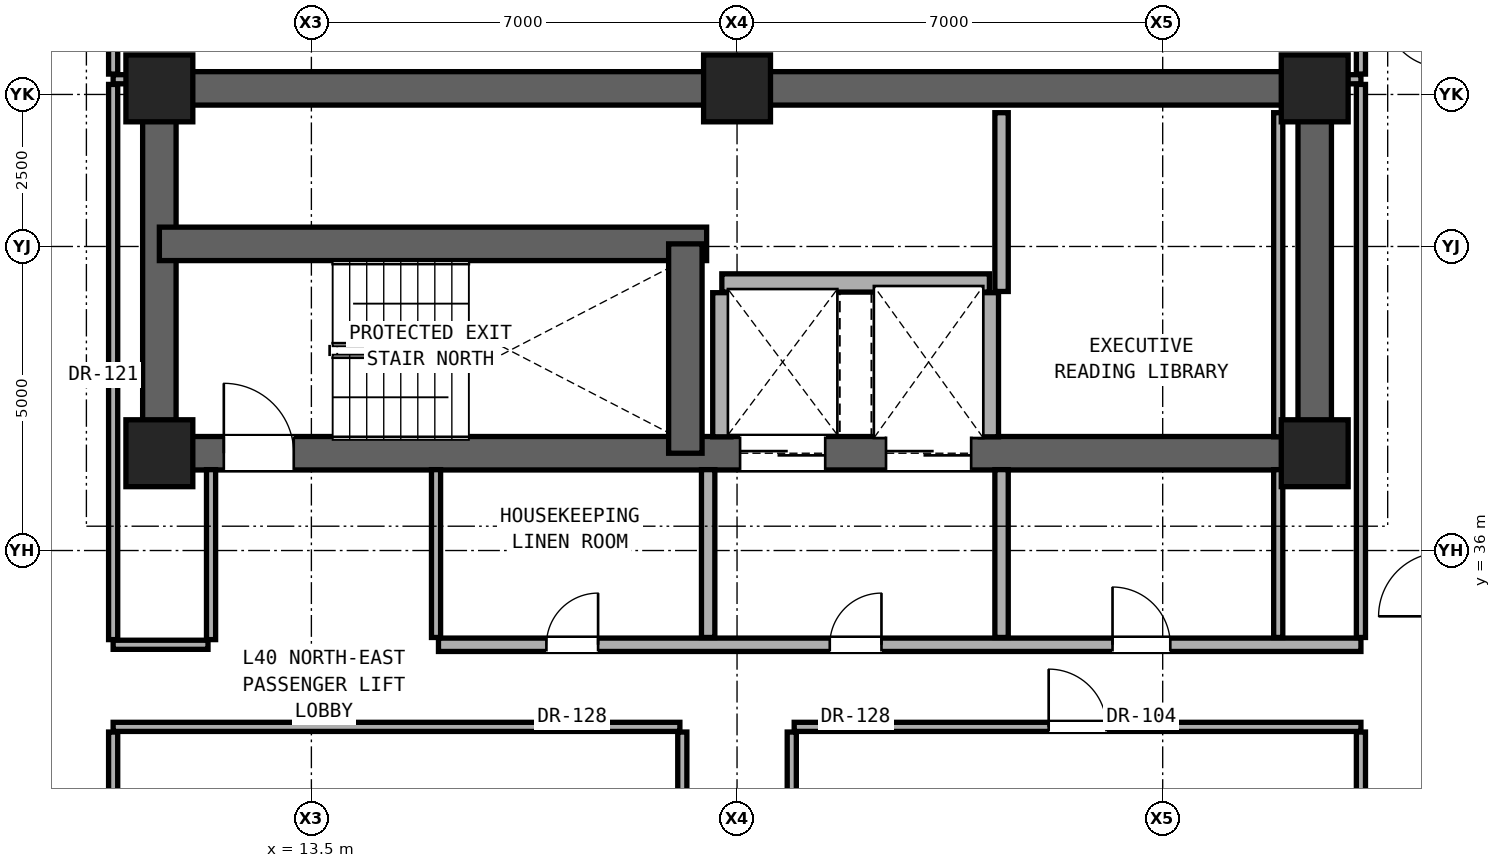
"""IFC4 building model, lengths in metres.
Left out: names, types, materials, properties, quantities, classifications, styles, units other than length and angle.
Written with IfcOpenShell. Run it as: python <this file> out.ifc"""

import sys

from ifc_helpers import new_model, si_unit, direction, frame, frame_2d, origin, origin_2d, place, context, subcontext, project, spatial, rectangle, extrude, element, fill, save


model = new_model("IFC4")
c1 = context("Model", 3, precision=1e-05, world=origin(), true_north=direction((0.0, 1.0)))
c2 = subcontext(c1, "Body", "Model", "MODEL_VIEW")
j1 = project(units=[si_unit("LENGTHUNIT", "METRE"), si_unit("PLANEANGLEUNIT", "RADIAN")], contexts=[c1])
p1 = place(None, origin())
s1 = spatial("IfcSite", under=j1, at=p1, CompositionType="ELEMENT")
p2 = place(p1, origin())
s2 = spatial("IfcBuilding", under=s1, at=p2, CompositionType="ELEMENT")
p3 = place(p2, frame((0.0, 0.0, 141.2)))
s3 = spatial("IfcBuildingStorey", under=s2, at=p3, CompositionType="ELEMENT", Elevation=141.2)
for number, where, z_axis, x_axis in (
    (1, (11.0, 37.6, 0.0), (0.0, 0.0, 1.0), (1.0, 0.0, 0.0)),
    (2, (30.0, 37.6, 0.0), (0.0, 0.0, 1.0), (1.0, 0.0, 0.0)),
    (3, (11.0, 43.6, 0.0), (0.0, 0.0, 1.0), (1.0, 0.0, 0.0)),
    (4, (20.5, 43.6, 0.0), (0.0, 0.0, 1.0), (1.0, 0.0, 0.0)),
    (5, (30.0, 43.6, 0.0), (0.0, 0.0, 1.0), (1.0, 0.0, 0.0)),
):
    element("IfcColumn", number, at=place(p3, frame(where, z_axis=z_axis, x_axis=x_axis)), inside=s3, PredefinedType="COLUMN", context=c2, shape_type="SweptSolid", body=[
        extrude(rectangle(XDim=1.1, YDim=1.1, at=origin_2d()), origin(), (0.0, 0.0, 1.0), 3.3),
    ])
p4 = place(p3, frame((11.0, 43.6, 0.0), z_axis=(0.0, 0.0, 1.0), x_axis=(1.0, 0.0, 0.0)))
e6 = element("IfcWall", 6, at=p4, inside=s3, PredefinedType="SHEAR", context=c2, shape_type="SweptSolid", body=[
    extrude(rectangle(XDim=19.0, YDim=0.55, at=frame_2d((9.5, 0.0))), origin(), (0.0, 0.0, 1.0), 3.08),
])
for number, where, z_axis, x_axis in (
    (7, (11.0, 37.6, 0.0), (0.0, 0.0, 1.0), (0.0, 1.0, 0.0)),
    (8, (30.0, 37.6, 0.0), (0.0, 0.0, 1.0), (0.0, 1.0, 0.0)),
):
    element("IfcWall", number, at=place(p3, frame(where, z_axis=z_axis, x_axis=x_axis)), inside=s3, PredefinedType="SHEAR", context=c2, shape_type="SweptSolid", body=[
        extrude(rectangle(XDim=6.0, YDim=0.55, at=frame_2d((3.0, 0.0))), origin(), (0.0, 0.0, 1.0), 3.08),
    ])
p5 = place(p3, frame((11.0, 37.6, 0.0), z_axis=(0.0, 0.0, 1.0), x_axis=(1.0, 0.0, 0.0)))
e9 = element("IfcWall", 9, at=p5, inside=s3, PredefinedType="SHEAR", context=c2, shape_type="SweptSolid", body=[
    extrude(rectangle(XDim=19.0, YDim=0.55, at=frame_2d((9.5, 0.0))), origin(), (0.0, 0.0, 1.0), 3.08),
])
p6 = place(p5, frame((1.06, 0.0, 0.0)))
e10 = element("IfcOpeningElement", 10, at=p6, cuts=e9, PredefinedType="OPENING", context=c2, shape_type="SweptSolid", body=[
    extrude(rectangle(XDim=1.15, YDim=2.2, at=frame_2d((0.575, 1.1))), frame((0.0, 0.285, 0.0), z_axis=(0.0, -1.0, 0.0), x_axis=(1.0, 0.0, 0.0)), (0.0, 0.0, 1.0), 0.57),
])
p7 = place(p5, frame((9.55, 0.0, 0.0)))
e11 = element("IfcOpeningElement", 11, at=p7, cuts=e9, PredefinedType="OPENING", context=c2, shape_type="SweptSolid", body=[
    extrude(rectangle(XDim=1.4, YDim=2.35, at=frame_2d((0.7, 1.175))), frame((0.0, 0.285, 0.0), z_axis=(0.0, -1.0, 0.0), x_axis=(1.0, 0.0, 0.0)), (0.0, 0.0, 1.0), 0.57),
])
p8 = place(p5, frame((11.95, 0.0, 0.0)))
e12 = element("IfcOpeningElement", 12, at=p8, cuts=e9, PredefinedType="OPENING", context=c2, shape_type="SweptSolid", body=[
    extrude(rectangle(XDim=1.4, YDim=2.35, at=frame_2d((0.7, 1.175))), frame((0.0, 0.285, 0.0), z_axis=(0.0, -1.0, 0.0), x_axis=(1.0, 0.0, 0.0)), (0.0, 0.0, 1.0), 0.57),
])
p9 = place(p3, frame((11.0, 41.043, 0.0), z_axis=(0.0, 0.0, 1.0), x_axis=(1.0, 0.0, 0.0)))
e13 = element("IfcWall", 13, at=p9, inside=s3, PredefinedType="SHEAR", context=c2, shape_type="SweptSolid", body=[
    extrude(rectangle(XDim=9.0, YDim=0.55, at=frame_2d((4.5, 0.0))), origin(), (0.0, 0.0, 1.0), 3.08),
])
p10 = place(p3, frame((19.65, 37.6, 0.0), z_axis=(0.0, 0.0, 1.0), x_axis=(0.0, 1.0, 0.0)))
e14 = element("IfcWall", 14, at=p10, inside=s3, PredefinedType="SHEAR", context=c2, shape_type="SweptSolid", body=[
    extrude(rectangle(XDim=3.443, YDim=0.55, at=frame_2d((1.721, 0.0))), origin(), (0.0, 0.0, 1.0), 3.08),
])
p11 = place(p3, frame((10.24, 33.1, 0.0), z_axis=(0.0, 0.0, 1.0), x_axis=(1.0, 0.0, 0.0)))
e15 = element("IfcWall", 15, at=p11, inside=s3, PredefinedType="PARTITIONING", context=c2, shape_type="SweptSolid", body=[
    extrude(rectangle(XDim=9.32, YDim=0.15, at=frame_2d((4.66, 0.0))), origin(), (0.0, 0.0, 1.0), 2.216),
])
p12 = place(p3, frame((21.44, 33.1, 0.0), z_axis=(0.0, 0.0, 1.0), x_axis=(1.0, 0.0, 0.0)))
e16 = element("IfcWall", 16, at=p12, inside=s3, PredefinedType="PARTITIONING", context=c2, shape_type="SweptSolid", body=[
    extrude(rectangle(XDim=9.32, YDim=0.15, at=frame_2d((4.66, 0.0))), origin(), (0.0, 0.0, 1.0), 2.216),
])
p13 = place(p12, frame((4.185, 0.0, 0.0)))
e17 = element("IfcOpeningElement", 17, at=p13, cuts=e16, PredefinedType="OPENING", context=c2, shape_type="SweptSolid", body=[
    extrude(rectangle(XDim=0.95, YDim=2.15, at=frame_2d((0.475, 1.075))), frame((0.0, 0.085, 0.0), z_axis=(0.0, -1.0, 0.0), x_axis=(1.0, 0.0, 0.0)), (0.0, 0.0, 1.0), 0.17),
])
p14 = place(p3, frame((10.24, 34.45, 0.0), z_axis=(0.0, 0.0, 1.0), x_axis=(1.0, 0.0, 0.0)))
e18 = element("IfcWall", 18, at=p14, inside=s3, PredefinedType="PARTITIONING", context=c2, shape_type="SweptSolid", body=[
    extrude(rectangle(XDim=1.56, YDim=0.15, at=frame_2d((0.78, 0.0))), origin(), (0.0, 0.0, 1.0), 2.216),
])
p15 = place(p3, frame((15.59, 34.45, 0.0), z_axis=(0.0, 0.0, 1.0), x_axis=(1.0, 0.0, 0.0)))
e19 = element("IfcWall", 19, at=p15, inside=s3, PredefinedType="SOLIDWALL", context=c2, shape_type="SweptSolid", body=[
    extrude(rectangle(XDim=15.17, YDim=0.22, at=frame_2d((7.585, 0.0))), origin(), (0.0, 0.0, 1.0), 2.216),
])
p16 = place(p15, frame((6.435, 0.0, 0.0)))
e20 = element("IfcOpeningElement", 20, at=p16, cuts=e19, PredefinedType="OPENING", context=c2, shape_type="SweptSolid", body=[
    extrude(rectangle(XDim=0.85, YDim=2.01, at=frame_2d((0.425, 1.005))), frame((0.0, 0.12, 0.0), z_axis=(0.0, -1.0, 0.0), x_axis=(1.0, 0.0, 0.0)), (0.0, 0.0, 1.0), 0.24),
])
p17 = place(p15, frame((11.085, 0.0, 0.0)))
e21 = element("IfcOpeningElement", 21, at=p17, cuts=e19, PredefinedType="OPENING", context=c2, shape_type="SweptSolid", body=[
    extrude(rectangle(XDim=0.95, YDim=2.15, at=frame_2d((0.475, 1.075))), frame((0.0, 0.12, 0.0), z_axis=(0.0, -1.0, 0.0), x_axis=(1.0, 0.0, 0.0)), (0.0, 0.0, 1.0), 0.24),
])
p18 = place(p15, frame((1.775, 0.0, 0.0)))
e22 = element("IfcOpeningElement", 22, at=p18, cuts=e19, PredefinedType="OPENING", context=c2, shape_type="SweptSolid", body=[
    extrude(rectangle(XDim=0.85, YDim=2.01, at=frame_2d((0.425, 1.005))), frame((0.0, 0.12, 0.0), z_axis=(0.0, -1.0, 0.0), x_axis=(1.0, 0.0, 0.0)), (0.0, 0.0, 1.0), 0.24),
])
p19 = place(p3, frame((20.25, 40.4, 0.0), z_axis=(0.0, 0.0, 1.0), x_axis=(1.0, 0.0, 0.0)))
e23 = element("IfcWall", 23, at=p19, inside=s3, PredefinedType="SOLIDWALL", context=c2, shape_type="SweptSolid", body=[
    extrude(rectangle(XDim=4.4, YDim=0.3, at=frame_2d((2.2, 0.0))), origin(), (0.0, 0.0, 1.0), 3.08),
])
for number, where, z_axis, x_axis in (
    (24, (10.24, 43.75, 0.0), (0.0, 0.0, 1.0), (1.0, 0.0, 0.0)),
    (25, (30.27, 43.75, 0.0), (0.0, 0.0, 1.0), (1.0, 0.0, 0.0)),
):
    element("IfcWall", number, at=place(p3, frame(where, z_axis=z_axis, x_axis=x_axis)), inside=s3, PredefinedType="PARTITIONING", context=c2, shape_type="SweptSolid", body=[
        extrude(rectangle(XDim=0.49, YDim=0.15, at=frame_2d((0.245, 0.0))), origin(), (0.0, 0.0, 1.0), 3.08),
    ])
p20 = place(p3, frame((10.24, 27.485, 0.0), z_axis=(0.0, 0.0, 1.0), x_axis=(0.0, 1.0, 0.0)))
e26 = element("IfcWall", 26, at=p20, inside=s3, PredefinedType="PARTITIONING", context=c2, shape_type="SweptSolid", body=[
    extrude(rectangle(XDim=5.53, YDim=0.15, at=frame_2d((2.765, 0.0))), origin(), (0.0, 0.0, 1.0), 2.299),
])
p21 = place(p20, frame((2.29, 0.0, 0.0)))
e27 = element("IfcOpeningElement", 27, at=p21, cuts=e26, PredefinedType="OPENING", context=c2, shape_type="SweptSolid", body=[
    extrude(rectangle(XDim=0.95, YDim=2.15, at=frame_2d((0.475, 1.075))), frame((0.0, 0.085, 0.0), z_axis=(0.0, -1.0, 0.0), x_axis=(1.0, 0.0, 0.0)), (0.0, 0.0, 1.0), 0.17),
])
p22 = place(p3, frame((10.24, 34.535, 0.0), z_axis=(0.0, 0.0, 1.0), x_axis=(0.0, 1.0, 0.0)))
e28 = element("IfcWall", 28, at=p22, inside=s3, PredefinedType="PARTITIONING", context=c2, shape_type="SweptSolid", body=[
    extrude(rectangle(XDim=9.13, YDim=0.15, at=frame_2d((4.565, 0.0))), origin(), (0.0, 0.0, 1.0), 2.456),
])
p23 = place(p3, frame((10.24, 43.835, 0.0), z_axis=(0.0, 0.0, 1.0), x_axis=(0.0, 1.0, 0.0)))
e29 = element("IfcWall", 29, at=p23, inside=s3, PredefinedType="PARTITIONING", context=c2, shape_type="SweptSolid", body=[
    extrude(rectangle(XDim=3.171, YDim=0.15, at=frame_2d((1.585, 0.0))), origin(), (0.0, 0.0, 1.0), 3.08),
])
p24 = place(p3, frame((11.85, 34.535, 0.0), z_axis=(0.0, 0.0, 1.0), x_axis=(0.0, 1.0, 0.0)))
e30 = element("IfcWall", 30, at=p24, inside=s3, PredefinedType="PARTITIONING", context=c2, shape_type="SweptSolid", body=[
    extrude(rectangle(XDim=2.795, YDim=0.15, at=frame_2d((1.397, 0.0))), origin(), (0.0, 0.0, 1.0), 3.08),
])
p25 = place(p3, frame((15.55, 34.57, 0.0), z_axis=(0.0, 0.0, 1.0), x_axis=(0.0, 1.0, 0.0)))
e31 = element("IfcWall", 31, at=p25, inside=s3, PredefinedType="PARTITIONING", context=c2, shape_type="SweptSolid", body=[
    extrude(rectangle(XDim=2.76, YDim=0.15, at=frame_2d((1.38, 0.0))), origin(), (0.0, 0.0, 1.0), 2.609),
])
p26 = place(p3, frame((19.6, 27.485, 0.0), z_axis=(0.0, 0.0, 1.0), x_axis=(0.0, 1.0, 0.0)))
e32 = element("IfcWall", 32, at=p26, inside=s3, PredefinedType="PARTITIONING", context=c2, shape_type="SweptSolid", body=[
    extrude(rectangle(XDim=5.53, YDim=0.15, at=frame_2d((2.765, 0.0))), origin(), (0.0, 0.0, 1.0), 2.216),
])
p27 = place(p3, frame((20.025, 34.57, 0.0), z_axis=(0.0, 0.0, 1.0), x_axis=(0.0, 1.0, 0.0)))
e33 = element("IfcWall", 33, at=p27, inside=s3, PredefinedType="SOLIDWALL", context=c2, shape_type="SweptSolid", body=[
    extrude(rectangle(XDim=2.76, YDim=0.22, at=frame_2d((1.38, 0.0))), origin(), (0.0, 0.0, 1.0), 3.08),
])
p28 = place(p3, frame((20.25, 37.87, 0.0), z_axis=(0.0, 0.0, 1.0), x_axis=(0.0, 1.0, 0.0)))
e34 = element("IfcWall", 34, at=p28, inside=s3, PredefinedType="SOLIDWALL", context=c2, shape_type="SweptSolid", body=[
    extrude(rectangle(XDim=2.37, YDim=0.3, at=frame_2d((1.185, 0.0))), origin(), (0.0, 0.0, 1.0), 3.08),
])
p29 = place(p3, frame((21.4, 27.485, 0.0), z_axis=(0.0, 0.0, 1.0), x_axis=(0.0, 1.0, 0.0)))
e35 = element("IfcWall", 35, at=p29, inside=s3, PredefinedType="PARTITIONING", context=c2, shape_type="SweptSolid", body=[
    extrude(rectangle(XDim=5.53, YDim=0.15, at=frame_2d((2.765, 0.0))), origin(), (0.0, 0.0, 1.0), 2.216),
])
p30 = place(p3, frame((24.65, 37.87, 0.0), z_axis=(0.0, 0.0, 1.0), x_axis=(0.0, 1.0, 0.0)))
e36 = element("IfcWall", 36, at=p30, inside=s3, PredefinedType="SOLIDWALL", context=c2, shape_type="SweptSolid", body=[
    extrude(rectangle(XDim=2.37, YDim=0.3, at=frame_2d((1.185, 0.0))), origin(), (0.0, 0.0, 1.0), 3.08),
])
p31 = place(p3, frame((24.85, 34.57, 0.0), z_axis=(0.0, 0.0, 1.0), x_axis=(0.0, 1.0, 0.0)))
e37 = element("IfcWall", 37, at=p31, inside=s3, PredefinedType="SOLIDWALL", context=c2, shape_type="SweptSolid", body=[
    extrude(rectangle(XDim=2.76, YDim=0.22, at=frame_2d((1.38, 0.0))), origin(), (0.0, 0.0, 1.0), 3.08),
])
p32 = place(p3, frame((24.85, 40.26, 0.0), z_axis=(0.0, 0.0, 1.0), x_axis=(0.0, 1.0, 0.0)))
e38 = element("IfcWall", 38, at=p32, inside=s3, PredefinedType="SOLIDWALL", context=c2, shape_type="SweptSolid", body=[
    extrude(rectangle(XDim=2.94, YDim=0.22, at=frame_2d((1.47, 0.0))), origin(), (0.0, 0.0, 1.0), 3.08),
])
p33 = place(p3, frame((29.4, 34.57, 0.0), z_axis=(0.0, 0.0, 1.0), x_axis=(0.0, 1.0, 0.0)))
e39 = element("IfcWall", 39, at=p33, inside=s3, PredefinedType="PARTITIONING", context=c2, shape_type="SweptSolid", body=[
    extrude(rectangle(XDim=2.76, YDim=0.15, at=frame_2d((1.38, 0.0))), origin(), (0.0, 0.0, 1.0), 3.08),
])
p34 = place(p3, frame((29.4, 37.87, 0.0), z_axis=(0.0, 0.0, 1.0), x_axis=(0.0, 1.0, 0.0)))
e40 = element("IfcWall", 40, at=p34, inside=s3, PredefinedType="PARTITIONING", context=c2, shape_type="SweptSolid", body=[
    extrude(rectangle(XDim=5.33, YDim=0.15, at=frame_2d((2.665, 0.0))), origin(), (0.0, 0.0, 1.0), 3.08),
])
p35 = place(p3, frame((30.76, 27.485, 0.0), z_axis=(0.0, 0.0, 1.0), x_axis=(0.0, 1.0, 0.0)))
e41 = element("IfcWall", 41, at=p35, inside=s3, PredefinedType="PARTITIONING", context=c2, shape_type="SweptSolid", body=[
    extrude(rectangle(XDim=5.53, YDim=0.15, at=frame_2d((2.765, 0.0))), origin(), (0.0, 0.0, 1.0), 2.299),
])
p36 = place(p3, frame((30.76, 34.57, 0.0), z_axis=(0.0, 0.0, 1.0), x_axis=(0.0, 1.0, 0.0)))
e42 = element("IfcWall", 42, at=p36, inside=s3, PredefinedType="PARTITIONING", context=c2, shape_type="SweptSolid", body=[
    extrude(rectangle(XDim=9.095, YDim=0.15, at=frame_2d((4.547, 0.0))), origin(), (0.0, 0.0, 1.0), 2.456),
])
p37 = place(p3, frame((30.76, 43.835, 0.0), z_axis=(0.0, 0.0, 1.0), x_axis=(0.0, 1.0, 0.0)))
e43 = element("IfcWall", 43, at=p37, inside=s3, PredefinedType="PARTITIONING", context=c2, shape_type="SweptSolid", body=[
    extrude(rectangle(XDim=3.171, YDim=0.15, at=frame_2d((1.585, 0.0))), origin(), (0.0, 0.0, 1.0), 3.08),
])
p38 = place(p37, frame((1.061, 0.0, 0.0)))
e44 = element("IfcOpeningElement", 44, at=p38, cuts=e43, PredefinedType="OPENING", context=c2, shape_type="SweptSolid", body=[
    extrude(rectangle(XDim=1.05, YDim=2.2, at=frame_2d((0.525, 1.1))), frame((0.0, 0.085, 0.0), z_axis=(0.0, -1.0, 0.0), x_axis=(1.0, 0.0, 0.0)), (0.0, 0.0, 1.0), 0.17),
])
p39 = place(p6, origin())
e45 = element("IfcDoor", 45, at=p39, inside=s3, OperationType="SINGLE_SWING_LEFT", PredefinedType="DOOR", context=c2, shape_type="SweptSolid", body=[
    extrude(rectangle(XDim=1.15, YDim=2.2, at=frame_2d((0.575, 1.1))), frame((0.0, 0.025, 0.0), z_axis=(0.0, -1.0, 0.0), x_axis=(1.0, 0.0, 0.0)), (0.0, 0.0, 1.0), 0.05),
])
fill(e10, e45)
p40 = place(p16, origin())
e46 = element("IfcDoor", 46, at=p40, inside=s3, OperationType="SINGLE_SWING_RIGHT", PredefinedType="DOOR", context=c2, shape_type="SweptSolid", body=[
    extrude(rectangle(XDim=0.85, YDim=2.01, at=frame_2d((0.425, 1.005))), frame((0.0, 0.025, 0.0), z_axis=(0.0, -1.0, 0.0), x_axis=(1.0, 0.0, 0.0)), (0.0, 0.0, 1.0), 0.05),
])
fill(e20, e46)
p41 = place(p17, origin())
e47 = element("IfcDoor", 47, at=p41, inside=s3, OperationType="SINGLE_SWING_LEFT", PredefinedType="DOOR", context=c2, shape_type="SweptSolid", body=[
    extrude(rectangle(XDim=0.95, YDim=2.15, at=frame_2d((0.475, 1.075))), frame((0.0, 0.025, 0.0), z_axis=(0.0, -1.0, 0.0), x_axis=(1.0, 0.0, 0.0)), (0.0, 0.0, 1.0), 0.05),
])
fill(e21, e47)
p42 = place(p18, origin())
e48 = element("IfcDoor", 48, at=p42, inside=s3, OperationType="SINGLE_SWING_RIGHT", PredefinedType="DOOR", context=c2, shape_type="SweptSolid", body=[
    extrude(rectangle(XDim=0.85, YDim=2.01, at=frame_2d((0.425, 1.005))), frame((0.0, 0.025, 0.0), z_axis=(0.0, -1.0, 0.0), x_axis=(1.0, 0.0, 0.0)), (0.0, 0.0, 1.0), 0.05),
])
fill(e22, e48)
p43 = place(p13, origin())
e49 = element("IfcDoor", 49, at=p43, inside=s3, OperationType="SINGLE_SWING_LEFT", PredefinedType="DOOR", context=c2, shape_type="SweptSolid", body=[
    extrude(rectangle(XDim=0.95, YDim=2.15, at=frame_2d((0.475, 1.075))), frame((0.0, 0.025, 0.0), z_axis=(0.0, -1.0, 0.0), x_axis=(1.0, 0.0, 0.0)), (0.0, 0.0, 1.0), 0.05),
])
fill(e17, e49)
p44 = place(p7, origin())
e50 = element("IfcDoor", 50, at=p44, inside=s3, OperationType="DOUBLE_DOOR_SLIDING", PredefinedType="DOOR", context=c2, shape_type="SweptSolid", body=[
    extrude(rectangle(XDim=1.4, YDim=2.35, at=frame_2d((0.7, 1.175))), frame((0.0, 0.025, 0.0), z_axis=(0.0, -1.0, 0.0), x_axis=(1.0, 0.0, 0.0)), (0.0, 0.0, 1.0), 0.05),
])
fill(e11, e50)
p45 = place(p8, origin())
e51 = element("IfcDoor", 51, at=p45, inside=s3, OperationType="DOUBLE_DOOR_SLIDING", PredefinedType="DOOR", context=c2, shape_type="SweptSolid", body=[
    extrude(rectangle(XDim=1.4, YDim=2.35, at=frame_2d((0.7, 1.175))), frame((0.0, 0.025, 0.0), z_axis=(0.0, -1.0, 0.0), x_axis=(1.0, 0.0, 0.0)), (0.0, 0.0, 1.0), 0.05),
])
fill(e12, e51)
save(model, sys.argv[1])
